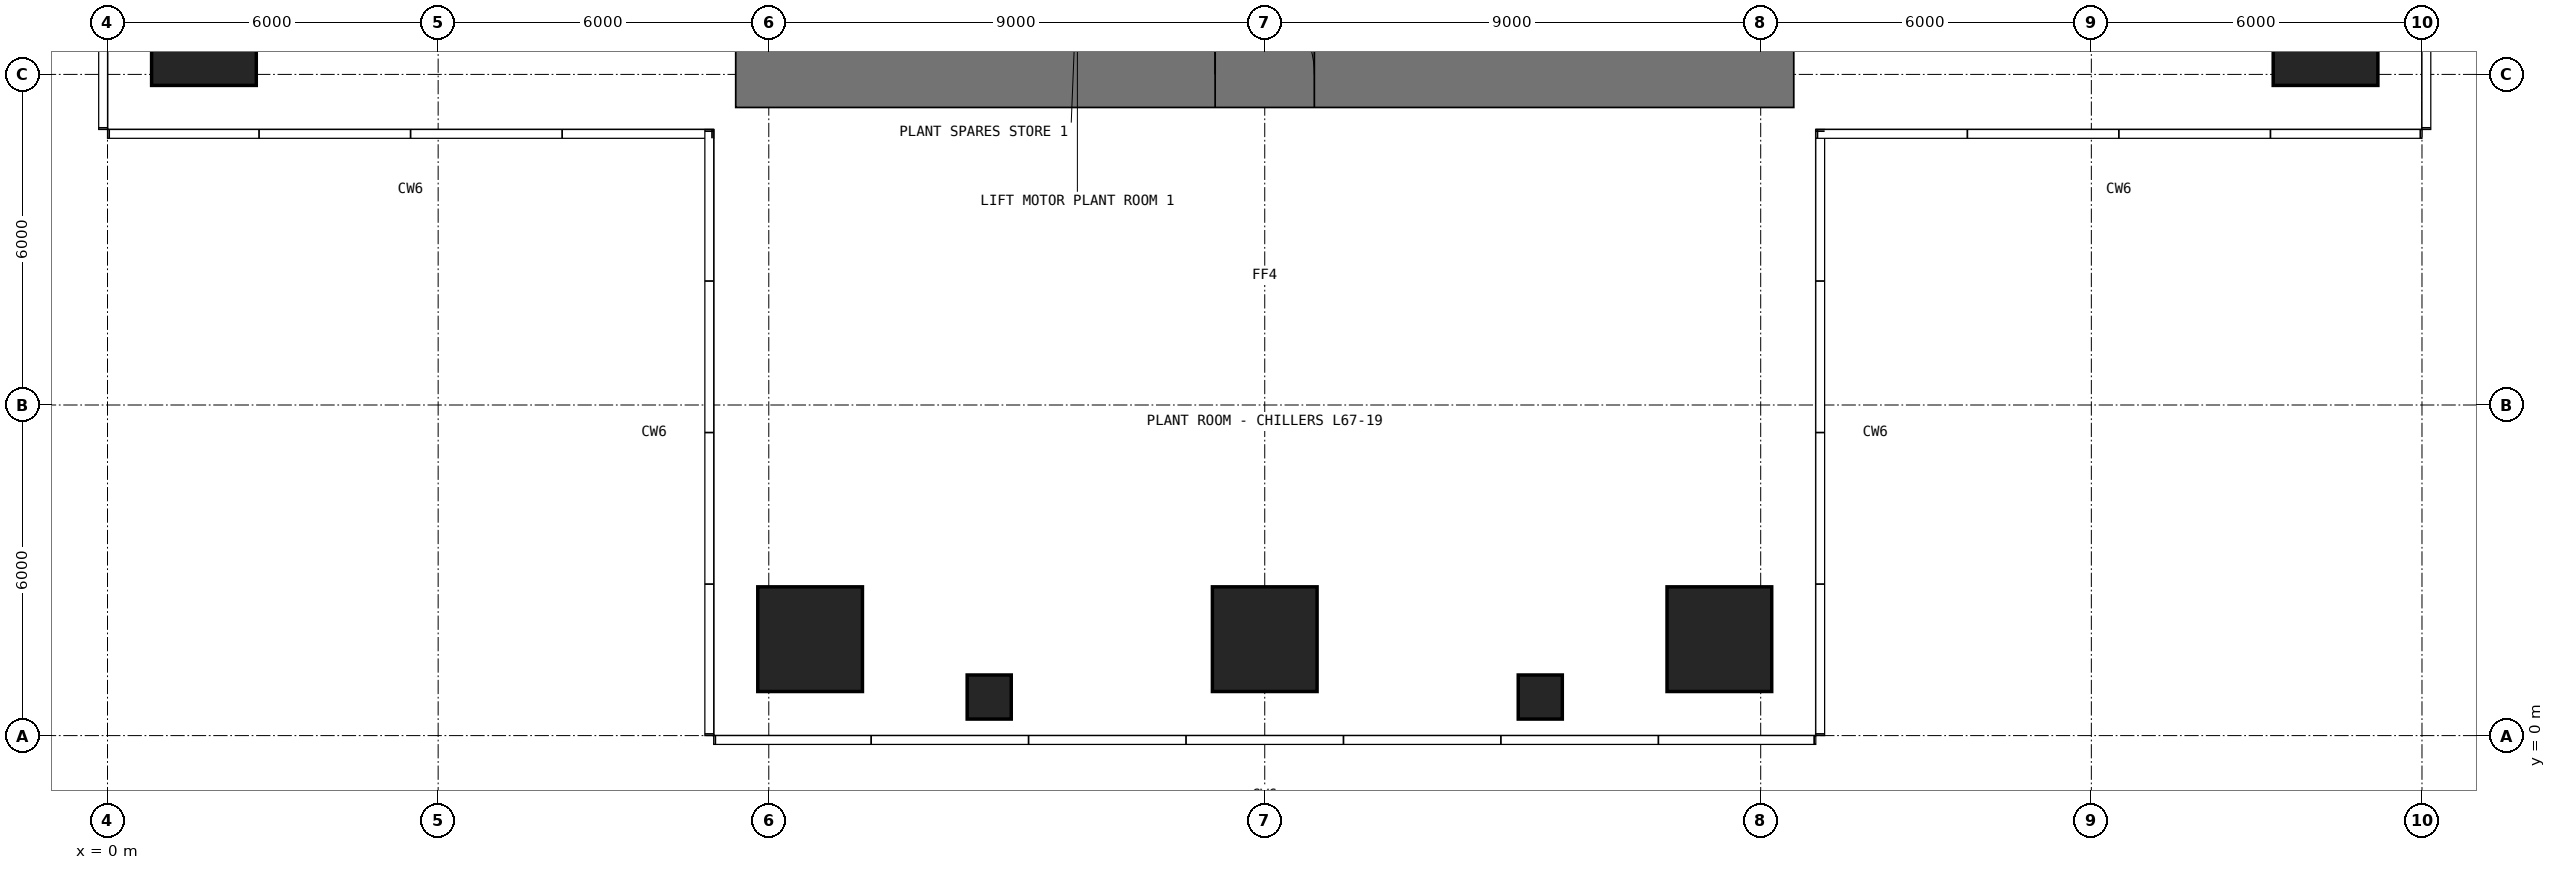
"""IFC4 building model, lengths in metres.
Left out: names, types, materials, properties, quantities, classifications, styles, units other than length and angle.
Written with IfcOpenShell. Run it as: python <this file> out.ifc"""

import sys

from ifc_helpers import new_model, si_unit, direction, frame, frame_2d, origin, origin_2d, place, context, subcontext, project, spatial, rectangle, extrude, element, fill, save


model = new_model("IFC4")
c1 = context("Model", 3, precision=1e-05, world=origin(), true_north=direction((0.0, 1.0)))
c2 = subcontext(c1, "Body", "Model", "MODEL_VIEW")
j1 = project(units=[si_unit("LENGTHUNIT", "METRE"), si_unit("PLANEANGLEUNIT", "RADIAN")], contexts=[c1])
p1 = place(None, origin())
s1 = spatial("IfcSite", under=j1, at=p1, CompositionType="ELEMENT")
p2 = place(p1, origin())
s2 = spatial("IfcBuilding", under=s1, at=p2, CompositionType="ELEMENT")
p3 = place(p2, frame((0.0, 0.0, 283.9)))
s3 = spatial("IfcBuildingStorey", under=s2, at=p3, CompositionType="ELEMENT", Elevation=283.9)
p4 = place(p3, frame((12.75, 1.75, 0.0), z_axis=(0.0, 0.0, 1.0), x_axis=(1.0, 0.0, 0.0)))
e1 = element("IfcColumn", 1, at=p4, inside=s3, PredefinedType="COLUMN", context=c2, shape_type="SweptSolid", body=[
    extrude(rectangle(XDim=1.9, YDim=1.9, at=origin_2d()), origin(), (0.0, 0.0, 1.0), 5.85),
])
p5 = place(p3, frame((16.0, 0.7, 0.0), z_axis=(0.0, 0.0, 1.0), x_axis=(1.0, 0.0, 0.0)))
e2 = element("IfcColumn", 2, at=p5, inside=s3, PredefinedType="COLUMN", context=c2, shape_type="SweptSolid", body=[
    extrude(rectangle(XDim=0.8, YDim=0.8, at=origin_2d()), origin(), (0.0, 0.0, 1.0), 5.85),
])
p6 = place(p3, frame((21.0, 1.75, 0.0), z_axis=(0.0, 0.0, 1.0), x_axis=(1.0, 0.0, 0.0)))
e3 = element("IfcColumn", 3, at=p6, inside=s3, PredefinedType="COLUMN", context=c2, shape_type="SweptSolid", body=[
    extrude(rectangle(XDim=1.9, YDim=1.9, at=origin_2d()), origin(), (0.0, 0.0, 1.0), 5.85),
])
p7 = place(p3, frame((26.0, 0.7, 0.0), z_axis=(0.0, 0.0, 1.0), x_axis=(1.0, 0.0, 0.0)))
e4 = element("IfcColumn", 4, at=p7, inside=s3, PredefinedType="COLUMN", context=c2, shape_type="SweptSolid", body=[
    extrude(rectangle(XDim=0.8, YDim=0.8, at=origin_2d()), origin(), (0.0, 0.0, 1.0), 5.85),
])
for number, where, z_axis, x_axis in (
    (5, (29.25, 1.75, 0.0), (0.0, 0.0, 1.0), (1.0, 0.0, 0.0)),
    (6, (1.75, 12.75, 0.0), (0.0, 0.0, 1.0), (1.0, 0.0, 0.0)),
    (7, (40.25, 12.75, 0.0), (0.0, 0.0, 1.0), (1.0, 0.0, 0.0)),
):
    element("IfcColumn", number, at=place(p3, frame(where, z_axis=z_axis, x_axis=x_axis)), inside=s3, PredefinedType="COLUMN", context=c2, shape_type="SweptSolid", body=[
        extrude(rectangle(XDim=1.9, YDim=1.9, at=origin_2d()), origin(), (0.0, 0.0, 1.0), 5.85),
    ])
p8 = place(p3, frame((11.4, 12.0, -0.1), z_axis=(0.0, 0.0, 1.0), x_axis=(1.0, 0.0, 0.0)))
e8 = element("IfcWall", 8, at=p8, inside=s3, PredefinedType="SHEAR", context=c2, shape_type="SweptSolid", body=[
    extrude(rectangle(XDim=19.2, YDim=1.2, at=frame_2d((9.6, 0.0))), origin(), (0.0, 0.0, 1.0), 5.95),
])
p9 = place(p8, frame((8.7, 0.0, 0.1)))
e9 = element("IfcOpeningElement", 9, at=p9, cuts=e8, PredefinedType="OPENING", context=c2, shape_type="SweptSolid", body=[
    extrude(rectangle(XDim=1.8, YDim=2.4, at=frame_2d((0.9, 1.2))), frame((0.0, 0.61, 0.0), z_axis=(0.0, -1.0, 0.0), x_axis=(1.0, 0.0, 0.0)), (0.0, 0.0, 1.0), 1.22),
])
p10 = place(p9, origin())
e10 = element("IfcDoor", 10, at=p10, inside=s3, OperationType="DOUBLE_DOOR_SINGLE_SWING", PredefinedType="DOOR", context=c2, shape_type="SweptSolid", body=[
    extrude(rectangle(XDim=1.8, YDim=2.4, at=frame_2d((0.9, 1.2))), frame((0.0, -0.275, 0.0), z_axis=(0.0, -1.0, 0.0), x_axis=(1.0, 0.0, 0.0)), (0.0, 0.0, 1.0), 0.05),
])
fill(e9, e10)
save(model, sys.argv[1])
